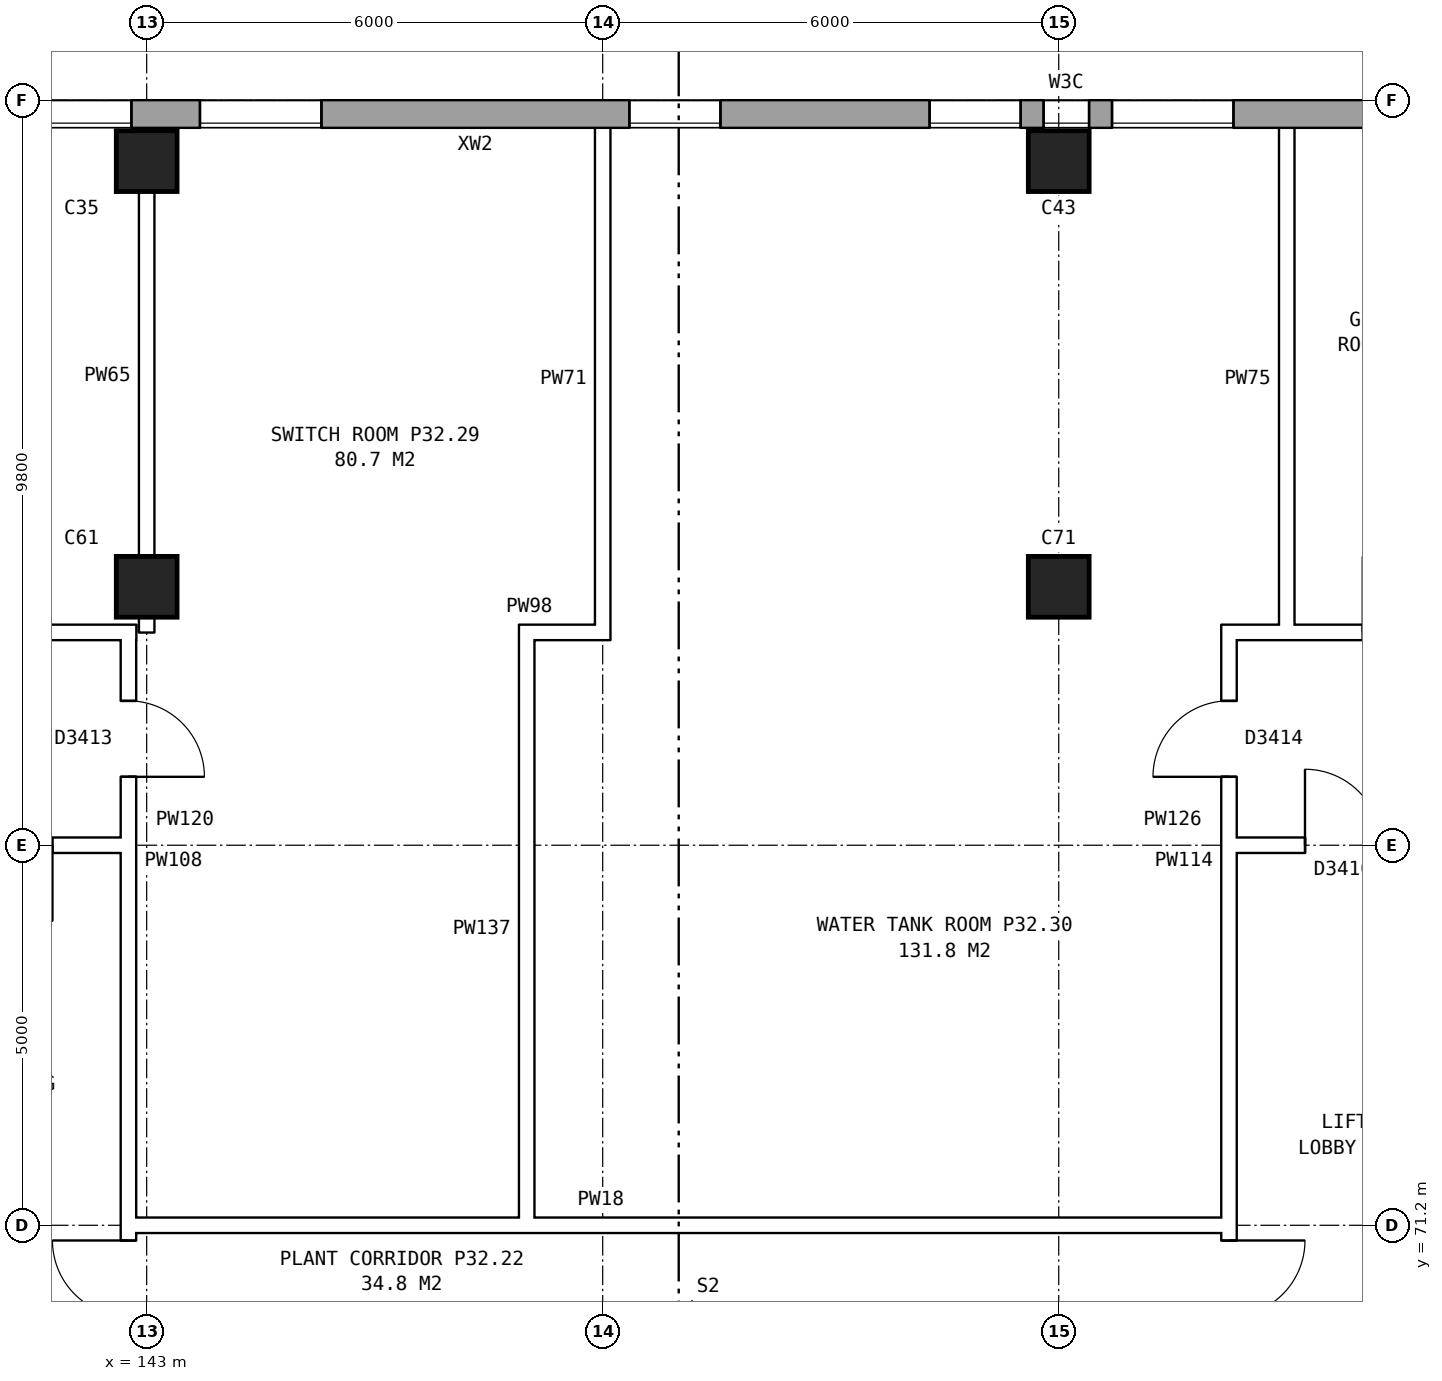
"""IFC4 building model, lengths in metres.
Left out: names, types, materials, properties, quantities, classifications, styles, units other than length and angle.
Written with IfcOpenShell. Run it as: python <this file> out.ifc"""

import sys

from ifc_helpers import new_model, si_unit, direction, frame, frame_2d, origin, origin_2d, place, context, subcontext, project, spatial, rectangle, extrude, element, fill, save


model = new_model("IFC4")
c1 = context("Model", 3, precision=1e-05, world=origin(), true_north=direction((0.0, 1.0)))
c2 = subcontext(c1, "Body", "Model", "MODEL_VIEW")
j1 = project(units=[si_unit("LENGTHUNIT", "METRE"), si_unit("PLANEANGLEUNIT", "RADIAN")], contexts=[c1])
p1 = place(None, origin())
s1 = spatial("IfcSite", under=j1, at=p1, CompositionType="ELEMENT")
p2 = place(p1, origin())
s2 = spatial("IfcBuilding", under=s1, at=p2, CompositionType="ELEMENT")
p3 = place(p2, frame((0.0, 0.0, 115.0)))
s3 = spatial("IfcBuildingStorey", under=s2, at=p3, CompositionType="ELEMENT", Elevation=115.0)
for number, where, z_axis, x_axis in (
    (1, (143.0, 79.6, 0.0), (0.0, 0.0, 1.0), (1.0, 0.0, 0.0)),
    (2, (143.0, 85.2, 0.0), (0.0, 0.0, 1.0), (1.0, 0.0, 0.0)),
    (3, (155.0, 79.6, 0.0), (0.0, 0.0, 1.0), (1.0, 0.0, 0.0)),
    (4, (155.0, 85.2, 0.0), (0.0, 0.0, 1.0), (1.0, 0.0, 0.0)),
):
    element("IfcColumn", number, at=place(p3, frame(where, z_axis=z_axis, x_axis=x_axis)), inside=s3, PredefinedType="COLUMN", context=c2, shape_type="SweptSolid", body=[
        extrude(rectangle(XDim=0.8, YDim=0.8, at=origin_2d()), origin(), (0.0, 0.0, 1.0), 4.2),
    ])
p4 = place(p3, frame((169.675, 85.82, 0.0), z_axis=(0.0, 0.0, 1.0), x_axis=(-1.0, 0.0, 0.0)))
e5 = element("IfcWall", 5, at=p4, inside=s3, PredefinedType="STANDARD", context=c2, shape_type="SweptSolid", body=[
    extrude(rectangle(XDim=35.601, YDim=0.36, at=frame_2d((17.8, 0.0))), origin(), (0.0, 0.0, 1.0), 4.2),
])
p5 = place(p4, frame((0.375, 0.0, 1.5)))
e6 = element("IfcOpeningElement", 6, at=p5, cuts=e5, PredefinedType="OPENING", context=c2, shape_type="SweptSolid", body=[
    extrude(rectangle(XDim=1.6, YDim=1.2, at=frame_2d((0.8, 0.6))), frame((0.0, 0.19, 0.0), z_axis=(0.0, -1.0, 0.0), x_axis=(1.0, 0.0, 0.0)), (0.0, 0.0, 1.0), 0.38),
])
p6 = place(p4, frame((2.875, 0.0, 1.5)))
e7 = element("IfcOpeningElement", 7, at=p6, cuts=e5, PredefinedType="OPENING", context=c2, shape_type="SweptSolid", body=[
    extrude(rectangle(XDim=1.6, YDim=1.2, at=frame_2d((0.8, 0.6))), frame((0.0, 0.19, 0.0), z_axis=(0.0, -1.0, 0.0), x_axis=(1.0, 0.0, 0.0)), (0.0, 0.0, 1.0), 0.38),
])
p7 = place(p4, frame((7.175, 0.0, 1.5)))
e8 = element("IfcOpeningElement", 8, at=p7, cuts=e5, PredefinedType="OPENING", context=c2, shape_type="SweptSolid", body=[
    extrude(rectangle(XDim=1.2, YDim=1.2, at=frame_2d((0.6, 0.6))), frame((0.0, 0.19, 0.0), z_axis=(0.0, -1.0, 0.0), x_axis=(1.0, 0.0, 0.0)), (0.0, 0.0, 1.0), 0.38),
])
p8 = place(p4, frame((12.375, 0.0, 1.5)))
e9 = element("IfcOpeningElement", 9, at=p8, cuts=e5, PredefinedType="OPENING", context=c2, shape_type="SweptSolid", body=[
    extrude(rectangle(XDim=1.6, YDim=1.2, at=frame_2d((0.8, 0.6))), frame((0.0, 0.19, 0.0), z_axis=(0.0, -1.0, 0.0), x_axis=(1.0, 0.0, 0.0)), (0.0, 0.0, 1.0), 0.38),
])
p9 = place(p4, frame((14.275, 0.0, 1.5)))
e10 = element("IfcOpeningElement", 10, at=p9, cuts=e5, PredefinedType="OPENING", context=c2, shape_type="SweptSolid", body=[
    extrude(rectangle(XDim=0.6, YDim=1.2, at=frame_2d((0.3, 0.6))), frame((0.0, 0.19, 0.0), z_axis=(0.0, -1.0, 0.0), x_axis=(1.0, 0.0, 0.0)), (0.0, 0.0, 1.0), 0.38),
])
p10 = place(p4, frame((15.175, 0.0, 1.5)))
e11 = element("IfcOpeningElement", 11, at=p10, cuts=e5, PredefinedType="OPENING", context=c2, shape_type="SweptSolid", body=[
    extrude(rectangle(XDim=1.2, YDim=1.2, at=frame_2d((0.6, 0.6))), frame((0.0, 0.19, 0.0), z_axis=(0.0, -1.0, 0.0), x_axis=(1.0, 0.0, 0.0)), (0.0, 0.0, 1.0), 0.38),
])
p11 = place(p4, frame((24.375, 0.0, 1.5)))
e12 = element("IfcOpeningElement", 12, at=p11, cuts=e5, PredefinedType="OPENING", context=c2, shape_type="SweptSolid", body=[
    extrude(rectangle(XDim=1.6, YDim=1.2, at=frame_2d((0.8, 0.6))), frame((0.0, 0.19, 0.0), z_axis=(0.0, -1.0, 0.0), x_axis=(1.0, 0.0, 0.0)), (0.0, 0.0, 1.0), 0.38),
])
p12 = place(p4, frame((26.875, 0.0, 1.5)))
e13 = element("IfcOpeningElement", 13, at=p12, cuts=e5, PredefinedType="OPENING", context=c2, shape_type="SweptSolid", body=[
    extrude(rectangle(XDim=1.2, YDim=1.2, at=frame_2d((0.6, 0.6))), frame((0.0, 0.19, 0.0), z_axis=(0.0, -1.0, 0.0), x_axis=(1.0, 0.0, 0.0)), (0.0, 0.0, 1.0), 0.38),
])
p13 = place(p4, frame((31.075, 0.0, 1.5)))
e14 = element("IfcOpeningElement", 14, at=p13, cuts=e5, PredefinedType="OPENING", context=c2, shape_type="SweptSolid", body=[
    extrude(rectangle(XDim=1.2, YDim=1.2, at=frame_2d((0.6, 0.6))), frame((0.0, 0.19, 0.0), z_axis=(0.0, -1.0, 0.0), x_axis=(1.0, 0.0, 0.0)), (0.0, 0.0, 1.0), 0.38),
])
p14 = place(p4, frame((19.125, 0.0, 1.5)))
e15 = element("IfcOpeningElement", 15, at=p14, cuts=e5, PredefinedType="OPENING", context=c2, shape_type="SweptSolid", body=[
    extrude(rectangle(XDim=1.2, YDim=1.2, at=frame_2d((0.6, 0.6))), frame((0.0, 0.19, 0.0), z_axis=(0.0, -1.0, 0.0), x_axis=(1.0, 0.0, 0.0)), (0.0, 0.0, 1.0), 0.38),
])
p15 = place(p3, frame((142.76, 63.9, 0.0), z_axis=(0.0, 0.0, 1.0), x_axis=(0.0, 1.0, 0.0)))
e16 = element("IfcWall", 16, at=p15, inside=s3, PredefinedType="PARTITIONING", context=c2, shape_type="SweptSolid", body=[
    extrude(rectangle(XDim=12.2, YDim=0.2, at=frame_2d((6.1, 0.0))), origin(), (0.0, 0.0, 1.0), 4.2),
])
p16 = place(p15, frame((5.1, 0.0, 0.0)))
e17 = element("IfcOpeningElement", 17, at=p16, cuts=e16, PredefinedType="OPENING", context=c2, shape_type="SweptSolid", body=[
    extrude(rectangle(XDim=2.0, YDim=2.1, at=frame_2d((1.0, 1.05))), frame((0.0, 0.11, 0.0), z_axis=(0.0, -1.0, 0.0), x_axis=(1.0, 0.0, 0.0)), (0.0, 0.0, 1.0), 0.22),
])
p17 = place(p3, frame((157.24, 63.9, 0.0), z_axis=(0.0, 0.0, 1.0), x_axis=(0.0, 1.0, 0.0)))
e18 = element("IfcWall", 18, at=p17, inside=s3, PredefinedType="PARTITIONING", context=c2, shape_type="SweptSolid", body=[
    extrude(rectangle(XDim=12.2, YDim=0.2, at=frame_2d((6.1, 0.0))), origin(), (0.0, 0.0, 1.0), 4.2),
])
p18 = place(p17, frame((5.1, 0.0, 0.0)))
e19 = element("IfcOpeningElement", 19, at=p18, cuts=e18, PredefinedType="OPENING", context=c2, shape_type="SweptSolid", body=[
    extrude(rectangle(XDim=2.0, YDim=2.1, at=frame_2d((1.0, 1.05))), frame((0.0, 0.11, 0.0), z_axis=(0.0, -1.0, 0.0), x_axis=(1.0, 0.0, 0.0)), (0.0, 0.0, 1.0), 0.22),
])
p19 = place(p3, frame((142.76, 71.2, 0.0), z_axis=(0.0, 0.0, 1.0), x_axis=(1.0, 0.0, 0.0)))
e20 = element("IfcWall", 20, at=p19, inside=s3, PredefinedType="PARTITIONING", context=c2, shape_type="SweptSolid", body=[
    extrude(rectangle(XDim=14.48, YDim=0.2, at=frame_2d((7.24, 0.0))), origin(), (0.0, 0.0, 1.0), 4.2),
])
p20 = place(p3, frame((139.76, 76.2, 0.0), z_axis=(0.0, 0.0, 1.0), x_axis=(1.0, 0.0, 0.0)))
e21 = element("IfcWall", 21, at=p20, inside=s3, PredefinedType="PARTITIONING", context=c2, shape_type="SweptSolid", body=[
    extrude(rectangle(XDim=3.1, YDim=0.2, at=frame_2d((1.55, 0.0))), origin(), (0.0, 0.0, 1.0), 4.2),
])
p21 = place(p20, frame((1.0, 0.0, 0.0)))
e22 = element("IfcOpeningElement", 22, at=p21, cuts=e21, PredefinedType="OPENING", context=c2, shape_type="SweptSolid", body=[
    extrude(rectangle(XDim=1.0, YDim=2.1, at=frame_2d((0.5, 1.05))), frame((0.0, 0.11, 0.0), z_axis=(0.0, -1.0, 0.0), x_axis=(1.0, 0.0, 0.0)), (0.0, 0.0, 1.0), 0.22),
])
p22 = place(p3, frame((157.14, 76.2, 0.0), z_axis=(0.0, 0.0, 1.0), x_axis=(1.0, 0.0, 0.0)))
e23 = element("IfcWall", 23, at=p22, inside=s3, PredefinedType="PARTITIONING", context=c2, shape_type="SweptSolid", body=[
    extrude(rectangle(XDim=3.1, YDim=0.2, at=frame_2d((1.55, 0.0))), origin(), (0.0, 0.0, 1.0), 4.2),
])
p23 = place(p22, frame((1.1, 0.0, 0.0)))
e24 = element("IfcOpeningElement", 24, at=p23, cuts=e23, PredefinedType="OPENING", context=c2, shape_type="SweptSolid", body=[
    extrude(rectangle(XDim=1.0, YDim=2.1, at=frame_2d((0.5, 1.05))), frame((0.0, 0.11, 0.0), z_axis=(0.0, -1.0, 0.0), x_axis=(1.0, 0.0, 0.0)), (0.0, 0.0, 1.0), 0.22),
])
p24 = place(p3, frame((147.9, 79.0, 0.0), z_axis=(0.0, 0.0, 1.0), x_axis=(1.0, 0.0, 0.0)))
e25 = element("IfcWall", 25, at=p24, inside=s3, PredefinedType="PARTITIONING", context=c2, shape_type="SweptSolid", body=[
    extrude(rectangle(XDim=1.2, YDim=0.2, at=frame_2d((0.6, 0.0))), origin(), (0.0, 0.0, 1.0), 4.2),
])
p25 = place(p3, frame((157.14, 79.0, 0.0), z_axis=(0.0, 0.0, 1.0), x_axis=(1.0, 0.0, 0.0)))
e26 = element("IfcWall", 26, at=p25, inside=s3, PredefinedType="PARTITIONING", context=c2, shape_type="SweptSolid", body=[
    extrude(rectangle(XDim=15.37, YDim=0.2, at=frame_2d((7.685, 0.0))), origin(), (0.0, 0.0, 1.0), 4.2),
])
p26 = place(p25, frame((1.86, 0.0, 0.0)))
e27 = element("IfcOpeningElement", 27, at=p26, cuts=e26, PredefinedType="OPENING", context=c2, shape_type="SweptSolid", body=[
    extrude(rectangle(XDim=1.0, YDim=2.1, at=frame_2d((0.5, 1.05))), frame((0.0, 0.11, 0.0), z_axis=(0.0, -1.0, 0.0), x_axis=(1.0, 0.0, 0.0)), (0.0, 0.0, 1.0), 0.22),
])
p27 = place(p25, frame((6.36, 0.0, 0.0)))
e28 = element("IfcOpeningElement", 28, at=p27, cuts=e26, PredefinedType="OPENING", context=c2, shape_type="SweptSolid", body=[
    extrude(rectangle(XDim=1.0, YDim=2.1, at=frame_2d((0.5, 1.05))), frame((0.0, 0.11, 0.0), z_axis=(0.0, -1.0, 0.0), x_axis=(1.0, 0.0, 0.0)), (0.0, 0.0, 1.0), 0.22),
])
p28 = place(p25, frame((14.05, 0.0, 0.0)))
e29 = element("IfcOpeningElement", 29, at=p28, cuts=e26, PredefinedType="OPENING", context=c2, shape_type="SweptSolid", body=[
    extrude(rectangle(XDim=1.0, YDim=2.1, at=frame_2d((0.5, 1.05))), frame((0.0, 0.11, 0.0), z_axis=(0.0, -1.0, 0.0), x_axis=(1.0, 0.0, 0.0)), (0.0, 0.0, 1.0), 0.22),
])
p29 = place(p3, frame((136.9, 79.0, 0.0), z_axis=(0.0, 0.0, 1.0), x_axis=(1.0, 0.0, 0.0)))
e30 = element("IfcWall", 30, at=p29, inside=s3, PredefinedType="PARTITIONING", context=c2, shape_type="SweptSolid", body=[
    extrude(rectangle(XDim=5.962, YDim=0.2, at=frame_2d((2.981, 0.0))), origin(), (0.0, 0.0, 1.0), 4.2),
])
p30 = place(p29, frame((2.481, 0.0, 0.0)))
e31 = element("IfcOpeningElement", 31, at=p30, cuts=e30, PredefinedType="OPENING", context=c2, shape_type="SweptSolid", body=[
    extrude(rectangle(XDim=1.0, YDim=2.1, at=frame_2d((0.5, 1.05))), frame((0.0, 0.11, 0.0), z_axis=(0.0, -1.0, 0.0), x_axis=(1.0, 0.0, 0.0)), (0.0, 0.0, 1.0), 0.22),
])
p31 = place(p3, frame((142.76, 76.1, 0.0), z_axis=(0.0, 0.0, 1.0), x_axis=(0.0, 1.0, 0.0)))
e32 = element("IfcWall", 32, at=p31, inside=s3, PredefinedType="PARTITIONING", context=c2, shape_type="SweptSolid", body=[
    extrude(rectangle(XDim=3.0, YDim=0.2, at=frame_2d((1.5, 0.0))), origin(), (0.0, 0.0, 1.0), 4.2),
])
p32 = place(p31, frame((1.0, 0.0, 0.0)))
e33 = element("IfcOpeningElement", 33, at=p32, cuts=e32, PredefinedType="OPENING", context=c2, shape_type="SweptSolid", body=[
    extrude(rectangle(XDim=1.0, YDim=2.1, at=frame_2d((0.5, 1.05))), frame((0.0, 0.11, 0.0), z_axis=(0.0, -1.0, 0.0), x_axis=(1.0, 0.0, 0.0)), (0.0, 0.0, 1.0), 0.22),
])
p33 = place(p3, frame((143.0, 79.0, 0.0), z_axis=(0.0, 0.0, 1.0), x_axis=(0.0, 1.0, 0.0)))
e34 = element("IfcWall", 34, at=p33, inside=s3, PredefinedType="PARTITIONING", context=c2, shape_type="SweptSolid", body=[
    extrude(rectangle(XDim=6.76, YDim=0.2, at=frame_2d((3.38, 0.0))), origin(), (0.0, 0.0, 1.0), 4.2),
])
p34 = place(p3, frame((148.0, 71.1, 0.0), z_axis=(0.0, 0.0, 1.0), x_axis=(0.0, 1.0, 0.0)))
e35 = element("IfcWall", 35, at=p34, inside=s3, PredefinedType="PARTITIONING", context=c2, shape_type="SweptSolid", body=[
    extrude(rectangle(XDim=8.0, YDim=0.2, at=frame_2d((4.0, 0.0))), origin(), (0.0, 0.0, 1.0), 4.2),
])
p35 = place(p3, frame((149.0, 78.9, 0.0), z_axis=(0.0, 0.0, 1.0), x_axis=(0.0, 1.0, 0.0)))
e36 = element("IfcWall", 36, at=p35, inside=s3, PredefinedType="PARTITIONING", context=c2, shape_type="SweptSolid", body=[
    extrude(rectangle(XDim=6.86, YDim=0.2, at=frame_2d((3.43, 0.0))), origin(), (0.0, 0.0, 1.0), 4.2),
])
p36 = place(p3, frame((157.24, 76.1, 0.0), z_axis=(0.0, 0.0, 1.0), x_axis=(0.0, 1.0, 0.0)))
e37 = element("IfcWall", 37, at=p36, inside=s3, PredefinedType="PARTITIONING", context=c2, shape_type="SweptSolid", body=[
    extrude(rectangle(XDim=3.0, YDim=0.2, at=frame_2d((1.5, 0.0))), origin(), (0.0, 0.0, 1.0), 4.2),
])
p37 = place(p36, frame((1.0, 0.0, 0.0)))
e38 = element("IfcOpeningElement", 38, at=p37, cuts=e37, PredefinedType="OPENING", context=c2, shape_type="SweptSolid", body=[
    extrude(rectangle(XDim=1.0, YDim=2.1, at=frame_2d((0.5, 1.05))), frame((0.0, 0.11, 0.0), z_axis=(0.0, -1.0, 0.0), x_axis=(1.0, 0.0, 0.0)), (0.0, 0.0, 1.0), 0.22),
])
p38 = place(p3, frame((158.0, 78.9, 0.0), z_axis=(0.0, 0.0, 1.0), x_axis=(0.0, 1.0, 0.0)))
e39 = element("IfcWall", 39, at=p38, inside=s3, PredefinedType="PARTITIONING", context=c2, shape_type="SweptSolid", body=[
    extrude(rectangle(XDim=6.86, YDim=0.2, at=frame_2d((3.43, 0.0))), origin(), (0.0, 0.0, 1.0), 4.2),
])
p39 = place(p8, origin())
e40 = element("IfcWindow", 40, at=p39, inside=s3, PartitioningType="DOUBLE_PANEL_HORIZONTAL", PredefinedType="WINDOW", context=c2, shape_type="SweptSolid", body=[
    extrude(rectangle(XDim=1.6, YDim=1.2, at=frame_2d((0.8, 0.6))), frame((0.0, 0.15, 0.0), z_axis=(0.0, -1.0, 0.0), x_axis=(1.0, 0.0, 0.0)), (0.0, 0.0, 1.0), 0.06),
])
fill(e9, e40)
p40 = place(p9, origin())
e41 = element("IfcWindow", 41, at=p40, inside=s3, PartitioningType="DOUBLE_PANEL_HORIZONTAL", PredefinedType="WINDOW", context=c2, shape_type="SweptSolid", body=[
    extrude(rectangle(XDim=0.6, YDim=1.2, at=frame_2d((0.3, 0.6))), frame((0.0, 0.15, 0.0), z_axis=(0.0, -1.0, 0.0), x_axis=(1.0, 0.0, 0.0)), (0.0, 0.0, 1.0), 0.06),
])
fill(e10, e41)
p41 = place(p10, origin())
e42 = element("IfcWindow", 42, at=p41, inside=s3, PartitioningType="DOUBLE_PANEL_HORIZONTAL", PredefinedType="WINDOW", context=c2, shape_type="SweptSolid", body=[
    extrude(rectangle(XDim=1.2, YDim=1.2, at=frame_2d((0.6, 0.6))), frame((0.0, 0.15, 0.0), z_axis=(0.0, -1.0, 0.0), x_axis=(1.0, 0.0, 0.0)), (0.0, 0.0, 1.0), 0.06),
])
fill(e11, e42)
p42 = place(p11, origin())
e43 = element("IfcWindow", 43, at=p42, inside=s3, PartitioningType="DOUBLE_PANEL_HORIZONTAL", PredefinedType="WINDOW", context=c2, shape_type="SweptSolid", body=[
    extrude(rectangle(XDim=1.6, YDim=1.2, at=frame_2d((0.8, 0.6))), frame((0.0, 0.15, 0.0), z_axis=(0.0, -1.0, 0.0), x_axis=(1.0, 0.0, 0.0)), (0.0, 0.0, 1.0), 0.06),
])
fill(e12, e43)
p43 = place(p12, origin())
e44 = element("IfcWindow", 44, at=p43, inside=s3, PartitioningType="DOUBLE_PANEL_HORIZONTAL", PredefinedType="WINDOW", context=c2, shape_type="SweptSolid", body=[
    extrude(rectangle(XDim=1.2, YDim=1.2, at=frame_2d((0.6, 0.6))), frame((0.0, 0.15, 0.0), z_axis=(0.0, -1.0, 0.0), x_axis=(1.0, 0.0, 0.0)), (0.0, 0.0, 1.0), 0.06),
])
fill(e13, e44)
p44 = place(p16, origin())
e45 = element("IfcDoor", 45, at=p44, inside=s3, OperationType="DOUBLE_DOOR_SINGLE_SWING", PredefinedType="DOOR", context=c2, shape_type="SweptSolid", body=[
    extrude(rectangle(XDim=2.0, YDim=2.1, at=frame_2d((1.0, 1.05))), frame((0.0, 0.025, 0.0), z_axis=(0.0, -1.0, 0.0), x_axis=(1.0, 0.0, 0.0)), (0.0, 0.0, 1.0), 0.05),
])
fill(e17, e45)
p45 = place(p18, frame((2.0, 0.0, 0.0), z_axis=(0.0, 0.0, 1.0), x_axis=(-1.0, 0.0, 0.0)))
e46 = element("IfcDoor", 46, at=p45, inside=s3, OperationType="DOUBLE_DOOR_SINGLE_SWING", PredefinedType="DOOR", context=c2, shape_type="SweptSolid", body=[
    extrude(rectangle(XDim=2.0, YDim=2.1, at=frame_2d((1.0, 1.05))), frame((0.0, 0.025, 0.0), z_axis=(0.0, -1.0, 0.0), x_axis=(1.0, 0.0, 0.0)), (0.0, 0.0, 1.0), 0.05),
])
fill(e19, e46)
p46 = place(p23, origin())
e47 = element("IfcDoor", 47, at=p46, inside=s3, OperationType="SINGLE_SWING_LEFT", PredefinedType="DOOR", context=c2, shape_type="SweptSolid", body=[
    extrude(rectangle(XDim=1.0, YDim=2.1, at=frame_2d((0.5, 1.05))), frame((0.0, 0.025, 0.0), z_axis=(0.0, -1.0, 0.0), x_axis=(1.0, 0.0, 0.0)), (0.0, 0.0, 1.0), 0.05),
])
fill(e24, e47)
p47 = place(p32, frame((1.0, 0.0, 0.0), z_axis=(0.0, 0.0, 1.0), x_axis=(-1.0, 0.0, 0.0)))
e48 = element("IfcDoor", 48, at=p47, inside=s3, OperationType="SINGLE_SWING_RIGHT", PredefinedType="DOOR", context=c2, shape_type="SweptSolid", body=[
    extrude(rectangle(XDim=1.0, YDim=2.1, at=frame_2d((0.5, 1.05))), frame((0.0, 0.025, 0.0), z_axis=(0.0, -1.0, 0.0), x_axis=(1.0, 0.0, 0.0)), (0.0, 0.0, 1.0), 0.05),
])
fill(e33, e48)
p48 = place(p37, origin())
e49 = element("IfcDoor", 49, at=p48, inside=s3, OperationType="SINGLE_SWING_LEFT", PredefinedType="DOOR", context=c2, shape_type="SweptSolid", body=[
    extrude(rectangle(XDim=1.0, YDim=2.1, at=frame_2d((0.5, 1.05))), frame((0.0, 0.025, 0.0), z_axis=(0.0, -1.0, 0.0), x_axis=(1.0, 0.0, 0.0)), (0.0, 0.0, 1.0), 0.05),
])
fill(e38, e49)
p49 = place(p14, origin())
e50 = element("IfcWindow", 50, at=p49, inside=s3, PartitioningType="DOUBLE_PANEL_HORIZONTAL", PredefinedType="WINDOW", context=c2, shape_type="SweptSolid", body=[
    extrude(rectangle(XDim=1.2, YDim=1.2, at=frame_2d((0.6, 0.6))), frame((0.0, 0.15, 0.0), z_axis=(0.0, -1.0, 0.0), x_axis=(1.0, 0.0, 0.0)), (0.0, 0.0, 1.0), 0.06),
])
fill(e15, e50)
save(model, sys.argv[1])
